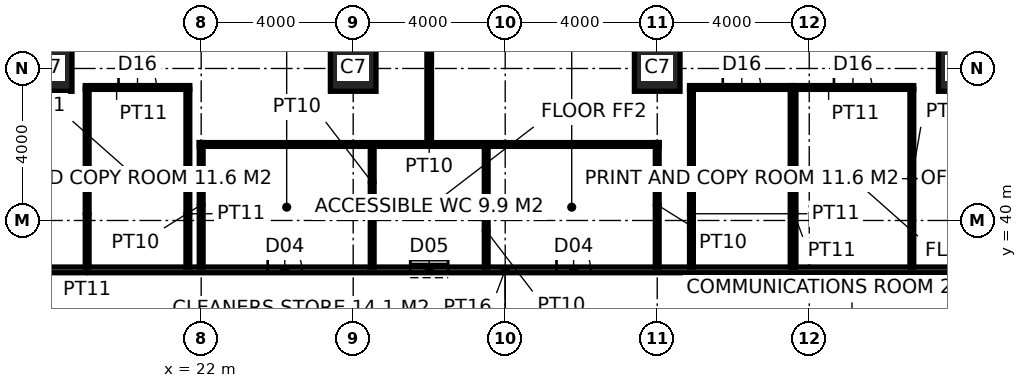
"""IFC4 building model, lengths in metres.
Left out: names, types, materials, properties, quantities, classifications, styles, units other than length and angle.
Written with IfcOpenShell. Run it as: python <this file> out.ifc"""

import sys

from ifc_helpers import new_model, si_unit, direction, frame, frame_2d, origin, origin_2d, place, context, subcontext, project, spatial, rectangle, hollow_rectangle, extrude, element, fill, save


model = new_model("IFC4")
c1 = context("Model", 3, precision=1e-05, world=origin(), true_north=direction((0.0, 1.0)))
c2 = subcontext(c1, "Body", "Model", "MODEL_VIEW")
j1 = project(units=[si_unit("LENGTHUNIT", "METRE"), si_unit("PLANEANGLEUNIT", "RADIAN")], contexts=[c1])
p1 = place(None, origin())
s1 = spatial("IfcSite", under=j1, at=p1, CompositionType="ELEMENT")
p2 = place(p1, origin())
s2 = spatial("IfcBuilding", under=s1, at=p2, CompositionType="ELEMENT")
p3 = place(p2, frame((0.0, 0.0, 59.0)))
s3 = spatial("IfcBuildingStorey", under=s2, at=p3, CompositionType="ELEMENT", Elevation=59.0)
for number, where, z_axis, x_axis in (
    (1, (18.0, 44.0, 0.0), (0.0, 0.0, 1.0), (1.0, 0.0, 0.0)),
    (2, (26.0, 44.0, 0.0), (0.0, 0.0, 1.0), (1.0, 0.0, 0.0)),
    (3, (34.0, 44.0, 0.0), (0.0, 0.0, 1.0), (1.0, 0.0, 0.0)),
    (4, (42.0, 44.0, 0.0), (0.0, 0.0, 1.0), (1.0, 0.0, 0.0)),
):
    element("IfcColumn", number, at=place(p3, frame(where, z_axis=z_axis, x_axis=x_axis)), inside=s3, PredefinedType="COLUMN", context=c2, shape_type="SweptSolid", body=[
        extrude(hollow_rectangle(XDim=1.2, YDim=1.2, WallThickness=0.1, at=origin_2d()), origin(), (0.0, 0.0, 1.0), 4.0),
    ])
p4 = place(p3, frame((15.775, 38.7, 0.0), z_axis=(0.0, 0.0, 1.0), x_axis=(1.0, 0.0, 0.0)))
e5 = element("IfcWall", 5, at=p4, inside=s3, PredefinedType="PARTITIONING", context=c2, shape_type="SweptSolid", body=[
    extrude(rectangle(XDim=28.45, YDim=0.15, at=frame_2d((14.225, 0.0))), origin(), (0.0, 0.0, 1.0), 3.85),
])
p5 = place(p4, frame((7.975, 0.0, 0.0)))
e6 = element("IfcOpeningElement", 6, at=p5, cuts=e5, PredefinedType="OPENING", context=c2, shape_type="SweptSolid", body=[
    extrude(rectangle(XDim=0.9, YDim=2.1, at=frame_2d((0.45, 1.05))), frame((0.0, 0.085, 0.0), z_axis=(0.0, -1.0, 0.0), x_axis=(1.0, 0.0, 0.0)), (0.0, 0.0, 1.0), 0.17),
])
p6 = place(p4, frame((11.725, 0.0, 0.0)))
e7 = element("IfcOpeningElement", 7, at=p6, cuts=e5, PredefinedType="OPENING", context=c2, shape_type="SweptSolid", body=[
    extrude(rectangle(XDim=1.0, YDim=2.1, at=frame_2d((0.5, 1.05))), frame((0.0, 0.085, 0.0), z_axis=(0.0, -1.0, 0.0), x_axis=(1.0, 0.0, 0.0)), (0.0, 0.0, 1.0), 0.17),
])
p7 = place(p4, frame((15.575, 0.0, 0.0)))
e8 = element("IfcOpeningElement", 8, at=p7, cuts=e5, PredefinedType="OPENING", context=c2, shape_type="SweptSolid", body=[
    extrude(rectangle(XDim=0.9, YDim=2.1, at=frame_2d((0.45, 1.05))), frame((0.0, 0.085, 0.0), z_axis=(0.0, -1.0, 0.0), x_axis=(1.0, 0.0, 0.0)), (0.0, 0.0, 1.0), 0.17),
])
for number, where, z_axis, x_axis in (
    (9, (22.0, 38.775, 0.0), (0.0, 0.0, 1.0), (0.0, 1.0, 0.0)),
    (10, (34.0, 38.775, 0.0), (0.0, 0.0, 1.0), (0.0, 1.0, 0.0)),
):
    element("IfcWall", number, at=place(p3, frame(where, z_axis=z_axis, x_axis=x_axis)), inside=s3, PredefinedType="PARTITIONING", context=c2, shape_type="SweptSolid", body=[
        extrude(rectangle(XDim=3.275, YDim=0.1, at=frame_2d((1.638, 0.0))), origin(), (0.0, 0.0, 1.0), 2.95),
    ])
p8 = place(p3, frame((21.95, 42.0, 0.0), z_axis=(0.0, 0.0, 1.0), x_axis=(1.0, 0.0, 0.0)))
e11 = element("IfcWall", 11, at=p8, inside=s3, PredefinedType="PARTITIONING", context=c2, shape_type="SweptSolid", body=[
    extrude(rectangle(XDim=12.1, YDim=0.1, at=frame_2d((6.05, 0.0))), origin(), (0.0, 0.0, 1.0), 3.85),
])
for number, where, z_axis, x_axis in (
    (12, (26.5, 38.775, 0.0), (0.0, 0.0, 1.0), (0.0, 1.0, 0.0)),
    (13, (29.5, 38.775, 0.0), (0.0, 0.0, 1.0), (0.0, 1.0, 0.0)),
):
    element("IfcWall", number, at=place(p3, frame(where, z_axis=z_axis, x_axis=x_axis)), inside=s3, PredefinedType="PARTITIONING", context=c2, shape_type="SweptSolid", body=[
        extrude(rectangle(XDim=3.175, YDim=0.1, at=frame_2d((1.587, 0.0))), origin(), (0.0, 0.0, 1.0), 3.85),
    ])
p9 = place(p3, frame((28.0, 42.05, 0.0), z_axis=(0.0, 0.0, 1.0), x_axis=(0.0, 1.0, 0.0)))
e14 = element("IfcWall", 14, at=p9, inside=s3, PredefinedType="PARTITIONING", context=c2, shape_type="SweptSolid", body=[
    extrude(rectangle(XDim=5.65, YDim=0.12, at=frame_2d((2.825, 0.0))), origin(), (0.0, 0.0, 1.0), 3.85),
])
p10 = place(p3, frame((18.95, 43.5, 0.0), z_axis=(0.0, 0.0, 1.0), x_axis=(1.0, 0.0, 0.0)))
e15 = element("IfcWall", 15, at=p10, inside=s3, PredefinedType="PARTITIONING", context=c2, shape_type="SweptSolid", body=[
    extrude(rectangle(XDim=2.75, YDim=0.1, at=frame_2d((1.375, 0.0))), origin(), (0.0, 0.0, 1.0), 3.85),
])
p11 = place(p10, frame((0.875, 0.0, 0.0)))
e16 = element("IfcOpeningElement", 16, at=p11, cuts=e15, PredefinedType="OPENING", context=c2, shape_type="SweptSolid", body=[
    extrude(rectangle(XDim=1.0, YDim=2.2, at=frame_2d((0.5, 1.1))), frame((0.0, 0.06, 0.0), z_axis=(0.0, -1.0, 0.0), x_axis=(1.0, 0.0, 0.0)), (0.0, 0.0, 1.0), 0.12),
])
p12 = place(p3, frame((34.85, 43.5, 0.0), z_axis=(0.0, 0.0, 1.0), x_axis=(1.0, 0.0, 0.0)))
e17 = element("IfcWall", 17, at=p12, inside=s3, PredefinedType="PARTITIONING", context=c2, shape_type="SweptSolid", body=[
    extrude(rectangle(XDim=2.75, YDim=0.1, at=frame_2d((1.375, 0.0))), origin(), (0.0, 0.0, 1.0), 3.85),
])
p13 = place(p12, frame((0.875, 0.0, 0.0)))
e18 = element("IfcOpeningElement", 18, at=p13, cuts=e17, PredefinedType="OPENING", context=c2, shape_type="SweptSolid", body=[
    extrude(rectangle(XDim=1.0, YDim=2.2, at=frame_2d((0.5, 1.1))), frame((0.0, 0.06, 0.0), z_axis=(0.0, -1.0, 0.0), x_axis=(1.0, 0.0, 0.0)), (0.0, 0.0, 1.0), 0.12),
])
p14 = place(p3, frame((37.55, 43.5, 0.0), z_axis=(0.0, 0.0, 1.0), x_axis=(1.0, 0.0, 0.0)))
e19 = element("IfcWall", 19, at=p14, inside=s3, PredefinedType="PARTITIONING", context=c2, shape_type="SweptSolid", body=[
    extrude(rectangle(XDim=3.2, YDim=0.1, at=frame_2d((1.6, 0.0))), origin(), (0.0, 0.0, 1.0), 3.85),
])
p15 = place(p14, frame((1.1, 0.0, 0.0)))
e20 = element("IfcOpeningElement", 20, at=p15, cuts=e19, PredefinedType="OPENING", context=c2, shape_type="SweptSolid", body=[
    extrude(rectangle(XDim=1.0, YDim=2.2, at=frame_2d((0.5, 1.1))), frame((0.0, 0.06, 0.0), z_axis=(0.0, -1.0, 0.0), x_axis=(1.0, 0.0, 0.0)), (0.0, 0.0, 1.0), 0.12),
])
for number, where, z_axis, x_axis in (
    (21, (19.0, 38.775, 0.0), (0.0, 0.0, 1.0), (0.0, 1.0, 0.0)),
    (22, (21.65, 38.775, 0.0), (0.0, 0.0, 1.0), (0.0, 1.0, 0.0)),
    (23, (34.9, 38.775, 0.0), (0.0, 0.0, 1.0), (0.0, 1.0, 0.0)),
    (24, (37.55, 38.775, 0.0), (0.0, 0.0, 1.0), (0.0, 1.0, 0.0)),
    (25, (37.6, 38.775, 0.0), (0.0, 0.0, 1.0), (0.0, 1.0, 0.0)),
    (26, (40.7, 38.775, 0.0), (0.0, 0.0, 1.0), (0.0, 1.0, 0.0)),
):
    element("IfcWall", number, at=place(p3, frame(where, z_axis=z_axis, x_axis=x_axis)), inside=s3, PredefinedType="PARTITIONING", context=c2, shape_type="SweptSolid", body=[
        extrude(rectangle(XDim=4.675, YDim=0.1, at=frame_2d((2.337, 0.0))), origin(), (0.0, 0.0, 1.0), 3.85),
    ])
p16 = place(p5, origin())
e27 = element("IfcDoor", 27, at=p16, inside=s3, OperationType="SINGLE_SWING_LEFT", PredefinedType="DOOR", context=c2, shape_type="SweptSolid", body=[
    extrude(rectangle(XDim=0.9, YDim=2.1, at=frame_2d((0.45, 1.05))), frame((0.0, 0.025, 0.0), z_axis=(0.0, -1.0, 0.0), x_axis=(1.0, 0.0, 0.0)), (0.0, 0.0, 1.0), 0.05),
])
fill(e6, e27)
p17 = place(p6, origin())
e28 = element("IfcDoor", 28, at=p17, inside=s3, OperationType="SLIDING_TO_LEFT", PredefinedType="DOOR", context=c2, shape_type="SweptSolid", body=[
    extrude(rectangle(XDim=1.0, YDim=2.1, at=frame_2d((0.5, 1.05))), frame((0.0, 0.025, 0.0), z_axis=(0.0, -1.0, 0.0), x_axis=(1.0, 0.0, 0.0)), (0.0, 0.0, 1.0), 0.05),
])
fill(e7, e28)
p18 = place(p7, origin())
e29 = element("IfcDoor", 29, at=p18, inside=s3, OperationType="SINGLE_SWING_LEFT", PredefinedType="DOOR", context=c2, shape_type="SweptSolid", body=[
    extrude(rectangle(XDim=0.9, YDim=2.1, at=frame_2d((0.45, 1.05))), frame((0.0, 0.025, 0.0), z_axis=(0.0, -1.0, 0.0), x_axis=(1.0, 0.0, 0.0)), (0.0, 0.0, 1.0), 0.05),
])
fill(e8, e29)
p19 = place(p11, origin())
e30 = element("IfcDoor", 30, at=p19, inside=s3, OperationType="SINGLE_SWING_LEFT", PredefinedType="DOOR", context=c2, shape_type="SweptSolid", body=[
    extrude(rectangle(XDim=1.0, YDim=2.2, at=frame_2d((0.5, 1.1))), frame((0.0, 0.025, 0.0), z_axis=(0.0, -1.0, 0.0), x_axis=(1.0, 0.0, 0.0)), (0.0, 0.0, 1.0), 0.05),
])
fill(e16, e30)
p20 = place(p13, origin())
e31 = element("IfcDoor", 31, at=p20, inside=s3, OperationType="SINGLE_SWING_LEFT", PredefinedType="DOOR", context=c2, shape_type="SweptSolid", body=[
    extrude(rectangle(XDim=1.0, YDim=2.2, at=frame_2d((0.5, 1.1))), frame((0.0, 0.025, 0.0), z_axis=(0.0, -1.0, 0.0), x_axis=(1.0, 0.0, 0.0)), (0.0, 0.0, 1.0), 0.05),
])
fill(e18, e31)
p21 = place(p15, origin())
e32 = element("IfcDoor", 32, at=p21, inside=s3, OperationType="SINGLE_SWING_LEFT", PredefinedType="DOOR", context=c2, shape_type="SweptSolid", body=[
    extrude(rectangle(XDim=1.0, YDim=2.2, at=frame_2d((0.5, 1.1))), frame((0.0, 0.025, 0.0), z_axis=(0.0, -1.0, 0.0), x_axis=(1.0, 0.0, 0.0)), (0.0, 0.0, 1.0), 0.05),
])
fill(e20, e32)
save(model, sys.argv[1])
